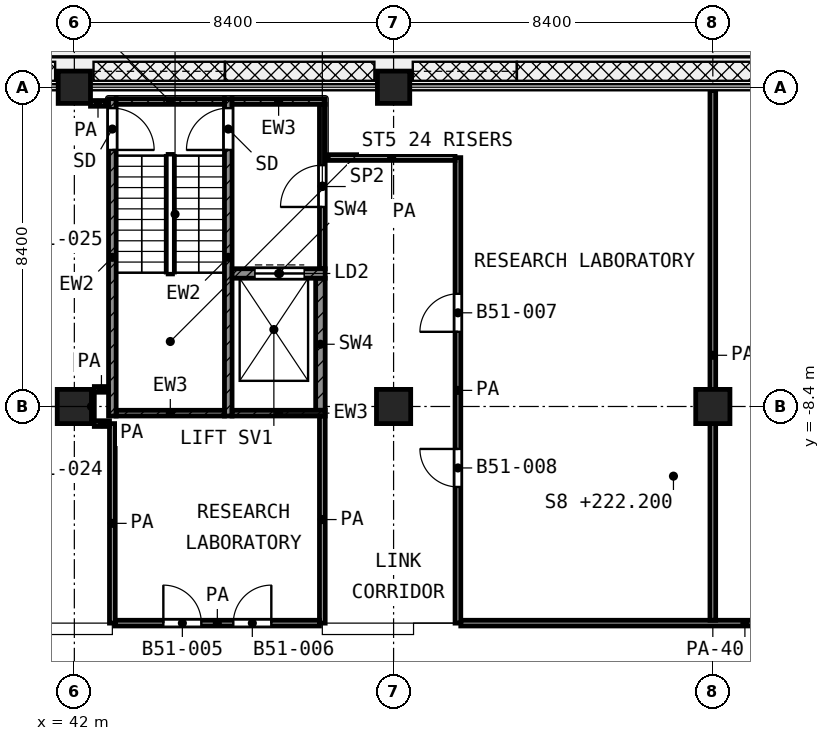
"""IFC4 building model, lengths in metres.
Left out: names, types, materials, properties, quantities, classifications, styles, units other than length and angle.
Written with IfcOpenShell. Run it as: python <this file> out.ifc"""

import sys

from ifc_helpers import new_model, si_unit, direction, frame, frame_2d, origin, origin_2d, place, context, subcontext, project, spatial, rectangle, extrude, element, fill, save


model = new_model("IFC4")
c1 = context("Model", 3, precision=1e-05, world=origin(), true_north=direction((0.0, 1.0)))
c2 = subcontext(c1, "Body", "Model", "MODEL_VIEW")
j1 = project(units=[si_unit("LENGTHUNIT", "METRE"), si_unit("PLANEANGLEUNIT", "RADIAN")], contexts=[c1])
p1 = place(None, origin())
s1 = spatial("IfcSite", under=j1, at=p1, CompositionType="ELEMENT")
p2 = place(p1, origin())
s2 = spatial("IfcBuilding", under=s1, at=p2, CompositionType="ELEMENT")
p3 = place(p2, frame((0.0, 0.0, 222.2)))
s3 = spatial("IfcBuildingStorey", under=s2, at=p3, CompositionType="ELEMENT", Elevation=222.2)
for number, where, z_axis, x_axis in (
    (1, (42.0, 0.0, 0.0), (0.0, 0.0, 1.0), (1.0, 0.0, 0.0)),
    (2, (50.4, 0.0, 0.0), (0.0, 0.0, 1.0), (1.0, 0.0, 0.0)),
):
    element("IfcColumn", number, at=place(p3, frame(where, z_axis=z_axis, x_axis=x_axis)), inside=s3, PredefinedType="COLUMN", context=c2, shape_type="SweptSolid", body=[
        extrude(rectangle(XDim=0.85, YDim=0.85, at=origin_2d()), origin(), (0.0, 0.0, 1.0), 4.2),
    ])
for number, where, z_axis, x_axis in (
    (3, (42.0, -8.4, 0.0), (0.0, 0.0, 1.0), (1.0, 0.0, 0.0)),
    (4, (50.4, -8.4, 0.0), (0.0, 0.0, 1.0), (1.0, 0.0, 0.0)),
    (5, (58.8, -8.4, 0.0), (0.0, 0.0, 1.0), (1.0, 0.0, 0.0)),
):
    element("IfcColumn", number, at=place(p3, frame(where, z_axis=z_axis, x_axis=x_axis)), inside=s3, PredefinedType="COLUMN", context=c2, shape_type="SweptSolid", body=[
        extrude(rectangle(XDim=0.9, YDim=0.9, at=origin_2d()), origin(), (0.0, 0.0, 1.0), 4.2),
    ])
p4 = place(p3, frame((43.0, -8.65, 0.0), z_axis=(0.0, 0.0, 1.0), x_axis=(0.0, 1.0, 0.0)))
e6 = element("IfcWall", 6, at=p4, inside=s3, PredefinedType="SHEAR", context=c2, shape_type="SweptSolid", body=[
    extrude(rectangle(XDim=8.35, YDim=0.2, at=frame_2d((4.175, 0.0))), origin(), (0.0, 0.0, 1.0), 3.6),
])
p5 = place(p4, frame((7.0, 0.0, 0.0)))
e7 = element("IfcOpeningElement", 7, at=p5, cuts=e6, PredefinedType="OPENING", context=c2, shape_type="SweptSolid", body=[
    extrude(rectangle(XDim=1.1, YDim=2.1, at=frame_2d((0.55, 1.05))), frame((0.0, 0.11, 0.0), z_axis=(0.0, -1.0, 0.0), x_axis=(1.0, 0.0, 0.0)), (0.0, 0.0, 1.0), 0.22),
])
p6 = place(p3, frame((46.05, -8.65, 0.0), z_axis=(0.0, 0.0, 1.0), x_axis=(0.0, 1.0, 0.0)))
e8 = element("IfcWall", 8, at=p6, inside=s3, PredefinedType="SHEAR", context=c2, shape_type="SweptSolid", body=[
    extrude(rectangle(XDim=8.35, YDim=0.2, at=frame_2d((4.175, 0.0))), origin(), (0.0, 0.0, 1.0), 3.6),
])
p7 = place(p6, frame((7.0, 0.0, 0.0)))
e9 = element("IfcOpeningElement", 9, at=p7, cuts=e8, PredefinedType="OPENING", context=c2, shape_type="SweptSolid", body=[
    extrude(rectangle(XDim=1.1, YDim=2.1, at=frame_2d((0.55, 1.05))), frame((0.0, 0.11, 0.0), z_axis=(0.0, -1.0, 0.0), x_axis=(1.0, 0.0, 0.0)), (0.0, 0.0, 1.0), 0.22),
])
p8 = place(p3, frame((43.1, -0.375, 0.0), z_axis=(0.0, 0.0, 1.0), x_axis=(1.0, 0.0, 0.0)))
e10 = element("IfcWall", 10, at=p8, inside=s3, PredefinedType="SHEAR", context=c2, shape_type="SweptSolid", body=[
    extrude(rectangle(XDim=2.85, YDim=0.15, at=frame_2d((1.425, 0.0))), origin(), (0.0, 0.0, 1.0), 3.6),
])
p9 = place(p3, frame((46.15, -0.375, 0.0), z_axis=(0.0, 0.0, 1.0), x_axis=(1.0, 0.0, 0.0)))
e11 = element("IfcWall", 11, at=p9, inside=s3, PredefinedType="SHEAR", context=c2, shape_type="SweptSolid", body=[
    extrude(rectangle(XDim=2.45, YDim=0.15, at=frame_2d((1.225, 0.0))), origin(), (0.0, 0.0, 1.0), 3.6),
])
p10 = place(p3, frame((43.1, -8.575, 0.0), z_axis=(0.0, 0.0, 1.0), x_axis=(1.0, 0.0, 0.0)))
e12 = element("IfcWall", 12, at=p10, inside=s3, PredefinedType="SHEAR", context=c2, shape_type="SweptSolid", body=[
    extrude(rectangle(XDim=2.85, YDim=0.15, at=frame_2d((1.425, 0.0))), origin(), (0.0, 0.0, 1.0), 3.6),
])
p11 = place(p3, frame((46.15, -8.575, 0.0), z_axis=(0.0, 0.0, 1.0), x_axis=(1.0, 0.0, 0.0)))
e13 = element("IfcWall", 13, at=p11, inside=s3, PredefinedType="SHEAR", context=c2, shape_type="SweptSolid", body=[
    extrude(rectangle(XDim=2.45, YDim=0.15, at=frame_2d((1.225, 0.0))), origin(), (0.0, 0.0, 1.0), 3.6),
])
p12 = place(p3, frame((46.15, -4.9, 0.0), z_axis=(0.0, 0.0, 1.0), x_axis=(1.0, 0.0, 0.0)))
e14 = element("IfcWall", 14, at=p12, inside=s3, PredefinedType="SHEAR", context=c2, shape_type="SweptSolid", body=[
    extrude(rectangle(XDim=2.45, YDim=0.25, at=frame_2d((1.225, 0.0))), origin(), (0.0, 0.0, 1.0), 3.6),
])
p13 = place(p12, frame((0.6, 0.0, 0.0)))
e15 = element("IfcOpeningElement", 15, at=p13, cuts=e14, PredefinedType="OPENING", context=c2, shape_type="SweptSolid", body=[
    extrude(rectangle(XDim=1.3, YDim=2.1, at=frame_2d((0.65, 1.05))), frame((0.0, 0.135, 0.0), z_axis=(0.0, -1.0, 0.0), x_axis=(1.0, 0.0, 0.0)), (0.0, 0.0, 1.0), 0.27),
])
p14 = place(p3, frame((48.475, -8.5, 0.0), z_axis=(0.0, 0.0, 1.0), x_axis=(0.0, 1.0, 0.0)))
e16 = element("IfcWall", 16, at=p14, inside=s3, PredefinedType="SHEAR", context=c2, shape_type="SweptSolid", body=[
    extrude(rectangle(XDim=3.475, YDim=0.25, at=frame_2d((1.738, 0.0))), origin(), (0.0, 0.0, 1.0), 3.6),
])
p15 = place(p3, frame((48.525, -4.775, 0.0), z_axis=(0.0, 0.0, 1.0), x_axis=(0.0, 1.0, 0.0)))
e17 = element("IfcWall", 17, at=p15, inside=s3, PredefinedType="PARTITIONING", context=c2, shape_type="SweptSolid", body=[
    extrude(rectangle(XDim=4.325, YDim=0.15, at=frame_2d((2.163, 0.0))), origin(), (0.0, 0.0, 1.0), 3.6),
])
p16 = place(p15, frame((1.625, 0.0, 0.0)))
e18 = element("IfcOpeningElement", 18, at=p16, cuts=e17, PredefinedType="OPENING", context=c2, shape_type="SweptSolid", body=[
    extrude(rectangle(XDim=1.1, YDim=2.1, at=frame_2d((0.55, 1.05))), frame((0.0, 0.085, 0.0), z_axis=(0.0, -1.0, 0.0), x_axis=(1.0, 0.0, 0.0)), (0.0, 0.0, 1.0), 0.17),
])
p17 = place(p3, frame((43.075, -14.1, 0.0), z_axis=(0.0, 0.0, 1.0), x_axis=(1.0, 0.0, 0.0)))
e19 = element("IfcWall", 19, at=p17, inside=s3, PredefinedType="PARTITIONING", context=c2, shape_type="SweptSolid", body=[
    extrude(rectangle(XDim=5.375, YDim=0.15, at=frame_2d((2.688, 0.0))), origin(), (0.0, 0.0, 1.0), 3.6),
])
p18 = place(p17, frame((1.267, 0.0, 0.0)))
e20 = element("IfcOpeningElement", 20, at=p18, cuts=e19, PredefinedType="OPENING", context=c2, shape_type="SweptSolid", body=[
    extrude(rectangle(XDim=1.0, YDim=2.1, at=frame_2d((0.5, 1.05))), frame((0.0, 0.085, 0.0), z_axis=(0.0, -1.0, 0.0), x_axis=(1.0, 0.0, 0.0)), (0.0, 0.0, 1.0), 0.17),
])
p19 = place(p17, frame((3.108, 0.0, 0.0)))
e21 = element("IfcOpeningElement", 21, at=p19, cuts=e19, PredefinedType="OPENING", context=c2, shape_type="SweptSolid", body=[
    extrude(rectangle(XDim=1.0, YDim=2.1, at=frame_2d((0.5, 1.05))), frame((0.0, 0.085, 0.0), z_axis=(0.0, -1.0, 0.0), x_axis=(1.0, 0.0, 0.0)), (0.0, 0.0, 1.0), 0.17),
])
p20 = place(p3, frame((52.168, -14.1, 0.0), z_axis=(0.0, 0.0, 1.0), x_axis=(1.0, 0.0, 0.0)))
e22 = element("IfcWall", 22, at=p20, inside=s3, PredefinedType="PARTITIONING", context=c2, shape_type="SweptSolid", body=[
    extrude(rectangle(XDim=14.952, YDim=0.15, at=frame_2d((7.476, 0.0))), origin(), (0.0, 0.0, 1.0), 2.7),
])
p21 = place(p20, frame((8.932, 0.0, 0.0)))
e23 = element("IfcOpeningElement", 23, at=p21, cuts=e22, PredefinedType="OPENING", context=c2, shape_type="SweptSolid", body=[
    extrude(rectangle(XDim=1.0, YDim=2.1, at=frame_2d((0.5, 1.05))), frame((0.0, 0.085, 0.0), z_axis=(0.0, -1.0, 0.0), x_axis=(1.0, 0.0, 0.0)), (0.0, 0.0, 1.0), 0.17),
])
p22 = place(p20, frame((11.732, 0.0, 0.0)))
e24 = element("IfcOpeningElement", 24, at=p22, cuts=e22, PredefinedType="OPENING", context=c2, shape_type="SweptSolid", body=[
    extrude(rectangle(XDim=1.0, YDim=2.1, at=frame_2d((0.5, 1.05))), frame((0.0, 0.085, 0.0), z_axis=(0.0, -1.0, 0.0), x_axis=(1.0, 0.0, 0.0)), (0.0, 0.0, 1.0), 0.17),
])
p23 = place(p3, frame((42.525, -8.85, 0.0), z_axis=(0.0, 0.0, 1.0), x_axis=(1.0, 0.0, 0.0)))
e25 = element("IfcWall", 25, at=p23, inside=s3, PredefinedType="PARTITIONING", context=c2, shape_type="SweptSolid", body=[
    extrude(rectangle(XDim=0.4, YDim=0.15, at=frame_2d((0.2, 0.0))), origin(), (0.0, 0.0, 1.0), 3.6),
])
p24 = place(p3, frame((42.526, -7.95, 0.0), z_axis=(0.0, 0.0, 1.0), x_axis=(1.0, 0.0, 0.0)))
e26 = element("IfcWall", 26, at=p24, inside=s3, PredefinedType="PARTITIONING", context=c2, shape_type="SweptSolid", body=[
    extrude(rectangle(XDim=0.374, YDim=0.15, at=frame_2d((0.187, 0.0))), origin(), (0.0, 0.0, 1.0), 3.6),
])
p25 = place(p3, frame((48.68, -1.85, 0.0), z_axis=(0.0, 0.0, 1.0), x_axis=(1.0, 0.0, 0.0)))
e27 = element("IfcWall", 27, at=p25, inside=s3, PredefinedType="PARTITIONING", context=c2, shape_type="SweptSolid", body=[
    extrude(rectangle(XDim=3.337, YDim=0.15, at=frame_2d((1.668, 0.0))), origin(), (0.0, 0.0, 1.0), 3.6),
])
p26 = place(p3, frame((42.425, -0.425, 0.0), z_axis=(0.0, 0.0, 1.0), x_axis=(1.0, 0.0, 0.0)))
e28 = element("IfcWall", 28, at=p26, inside=s3, PredefinedType="PARTITIONING", context=c2, shape_type="SweptSolid", body=[
    extrude(rectangle(XDim=0.395, YDim=0.15, at=frame_2d((0.198, 0.0))), origin(), (0.0, 0.0, 1.0), 3.6),
])
p27 = place(p3, frame((42.45, -8.85, 0.0), z_axis=(0.0, 0.0, 1.0), x_axis=(0.0, 1.0, 0.0)))
e29 = element("IfcWall", 29, at=p27, inside=s3, PredefinedType="PARTITIONING", context=c2, shape_type="SweptSolid", body=[
    extrude(rectangle(XDim=0.899, YDim=0.15, at=frame_2d((0.45, 0.0))), origin(), (0.0, 0.0, 1.0), 3.6),
])
p28 = place(p3, frame((43.0, -14.1, 0.0), z_axis=(0.0, 0.0, 1.0), x_axis=(0.0, 1.0, 0.0)))
e30 = element("IfcWall", 30, at=p28, inside=s3, PredefinedType="PARTITIONING", context=c2, shape_type="SweptSolid", body=[
    extrude(rectangle(XDim=5.25, YDim=0.15, at=frame_2d((2.625, 0.0))), origin(), (0.0, 0.0, 1.0), 3.6),
])
p29 = place(p3, frame((48.525, -14.1, 0.0), z_axis=(0.0, 0.0, 1.0), x_axis=(0.0, 1.0, 0.0)))
e31 = element("IfcWall", 31, at=p29, inside=s3, PredefinedType="PARTITIONING", context=c2, shape_type="SweptSolid", body=[
    extrude(rectangle(XDim=5.45, YDim=0.15, at=frame_2d((2.725, 0.0))), origin(), (0.0, 0.0, 1.0), 3.6),
])
p30 = place(p3, frame((52.093, -14.1, 0.0), z_axis=(0.0, 0.0, 1.0), x_axis=(0.0, 1.0, 0.0)))
e32 = element("IfcWall", 32, at=p30, inside=s3, PredefinedType="PARTITIONING", context=c2, shape_type="SweptSolid", body=[
    extrude(rectangle(XDim=12.248, YDim=0.15, at=frame_2d((6.124, 0.0))), origin(), (0.0, 0.0, 1.0), 3.6),
])
p31 = place(p30, frame((7.665, 0.0, 0.0)))
e33 = element("IfcOpeningElement", 33, at=p31, cuts=e32, PredefinedType="OPENING", context=c2, shape_type="SweptSolid", body=[
    extrude(rectangle(XDim=1.0, YDim=2.1, at=frame_2d((0.5, 1.05))), frame((0.0, 0.085, 0.0), z_axis=(0.0, -1.0, 0.0), x_axis=(1.0, 0.0, 0.0)), (0.0, 0.0, 1.0), 0.17),
])
p32 = place(p30, frame((3.583, 0.0, 0.0)))
e34 = element("IfcOpeningElement", 34, at=p32, cuts=e32, PredefinedType="OPENING", context=c2, shape_type="SweptSolid", body=[
    extrude(rectangle(XDim=1.0, YDim=2.1, at=frame_2d((0.5, 1.05))), frame((0.0, 0.085, 0.0), z_axis=(0.0, -1.0, 0.0), x_axis=(1.0, 0.0, 0.0)), (0.0, 0.0, 1.0), 0.17),
])
p33 = place(p3, frame((58.8, -14.025, 0.0), z_axis=(0.0, 0.0, 1.0), x_axis=(0.0, 1.0, 0.0)))
e35 = element("IfcWall", 35, at=p33, inside=s3, PredefinedType="PARTITIONING", context=c2, shape_type="SweptSolid", body=[
    extrude(rectangle(XDim=13.945, YDim=0.15, at=frame_2d((6.972, 0.0))), origin(), (0.0, 0.0, 1.0), 3.6),
])
p34 = place(p5, frame((1.1, 0.0, 0.0), z_axis=(0.0, 0.0, 1.0), x_axis=(-1.0, 0.0, 0.0)))
e36 = element("IfcDoor", 36, at=p34, inside=s3, OperationType="SINGLE_SWING_LEFT", PredefinedType="DOOR", context=c2, shape_type="SweptSolid", body=[
    extrude(rectangle(XDim=1.1, YDim=2.1, at=frame_2d((0.55, 1.05))), frame((0.0, 0.025, 0.0), z_axis=(0.0, -1.0, 0.0), x_axis=(1.0, 0.0, 0.0)), (0.0, 0.0, 1.0), 0.05),
])
fill(e7, e36)
p35 = place(p7, origin())
e37 = element("IfcDoor", 37, at=p35, inside=s3, OperationType="SINGLE_SWING_LEFT", PredefinedType="DOOR", context=c2, shape_type="SweptSolid", body=[
    extrude(rectangle(XDim=1.1, YDim=2.1, at=frame_2d((0.55, 1.05))), frame((0.0, 0.025, 0.0), z_axis=(0.0, -1.0, 0.0), x_axis=(1.0, 0.0, 0.0)), (0.0, 0.0, 1.0), 0.05),
])
fill(e9, e37)
p36 = place(p13, origin())
e38 = element("IfcDoor", 38, at=p36, inside=s3, OperationType="DOUBLE_DOOR_SLIDING", PredefinedType="DOOR", context=c2, shape_type="SweptSolid", body=[
    extrude(rectangle(XDim=1.3, YDim=2.1, at=frame_2d((0.65, 1.05))), frame((0.0, 0.025, 0.0), z_axis=(0.0, -1.0, 0.0), x_axis=(1.0, 0.0, 0.0)), (0.0, 0.0, 1.0), 0.05),
])
fill(e15, e38)
p37 = place(p16, origin())
e39 = element("IfcDoor", 39, at=p37, inside=s3, OperationType="SINGLE_SWING_LEFT", PredefinedType="DOOR", context=c2, shape_type="SweptSolid", body=[
    extrude(rectangle(XDim=1.1, YDim=2.1, at=frame_2d((0.55, 1.05))), frame((0.0, 0.025, 0.0), z_axis=(0.0, -1.0, 0.0), x_axis=(1.0, 0.0, 0.0)), (0.0, 0.0, 1.0), 0.05),
])
fill(e18, e39)
p38 = place(p18, origin())
e40 = element("IfcDoor", 40, at=p38, inside=s3, OperationType="SINGLE_SWING_LEFT", PredefinedType="DOOR", context=c2, shape_type="SweptSolid", body=[
    extrude(rectangle(XDim=1.0, YDim=2.1, at=frame_2d((0.5, 1.05))), frame((0.0, 0.025, 0.0), z_axis=(0.0, -1.0, 0.0), x_axis=(1.0, 0.0, 0.0)), (0.0, 0.0, 1.0), 0.05),
])
fill(e20, e40)
p39 = place(p19, origin())
e41 = element("IfcDoor", 41, at=p39, inside=s3, OperationType="SINGLE_SWING_RIGHT", PredefinedType="DOOR", context=c2, shape_type="SweptSolid", body=[
    extrude(rectangle(XDim=1.0, YDim=2.1, at=frame_2d((0.5, 1.05))), frame((0.0, 0.025, 0.0), z_axis=(0.0, -1.0, 0.0), x_axis=(1.0, 0.0, 0.0)), (0.0, 0.0, 1.0), 0.05),
])
fill(e21, e41)
p40 = place(p31, origin())
e42 = element("IfcDoor", 42, at=p40, inside=s3, OperationType="SINGLE_SWING_LEFT", PredefinedType="DOOR", context=c2, shape_type="SweptSolid", body=[
    extrude(rectangle(XDim=1.0, YDim=2.1, at=frame_2d((0.5, 1.05))), frame((0.0, 0.025, 0.0), z_axis=(0.0, -1.0, 0.0), x_axis=(1.0, 0.0, 0.0)), (0.0, 0.0, 1.0), 0.05),
])
fill(e33, e42)
p41 = place(p32, origin())
e43 = element("IfcDoor", 43, at=p41, inside=s3, OperationType="SINGLE_SWING_RIGHT", PredefinedType="DOOR", context=c2, shape_type="SweptSolid", body=[
    extrude(rectangle(XDim=1.0, YDim=2.1, at=frame_2d((0.5, 1.05))), frame((0.0, 0.025, 0.0), z_axis=(0.0, -1.0, 0.0), x_axis=(1.0, 0.0, 0.0)), (0.0, 0.0, 1.0), 0.05),
])
fill(e34, e43)
save(model, sys.argv[1])
